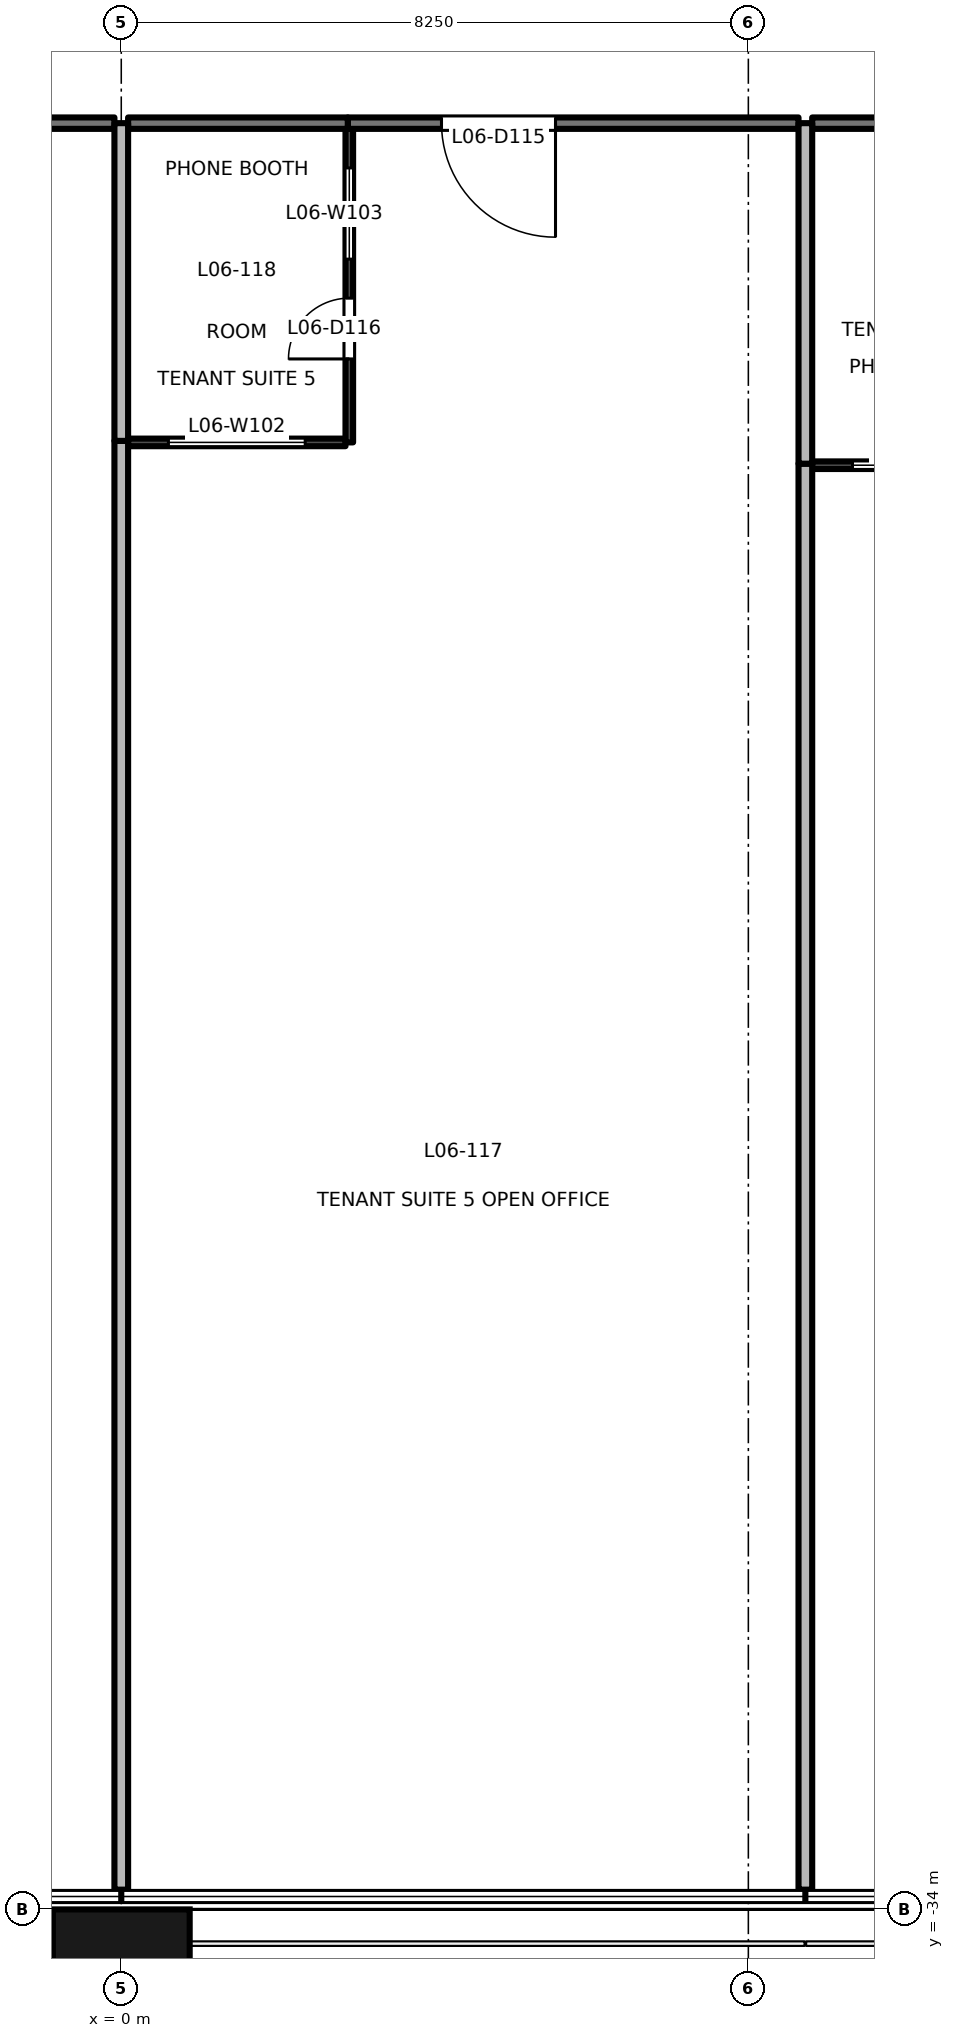
"""IFC4 building model, lengths in metres.
Left out: names, types, materials, properties, quantities, classifications, styles, units other than length and angle.
Written with IfcOpenShell. Run it as: python <this file> out.ifc"""

import sys

from ifc_helpers import new_model, si_unit, direction, frame, frame_2d, origin, origin_2d, place, context, subcontext, project, spatial, rectangle, extrude, element, fill, save


model = new_model("IFC4")
c1 = context("Model", 3, precision=1e-05, world=origin(), true_north=direction((0.0, 1.0)))
c2 = subcontext(c1, "Body", "Model", "MODEL_VIEW")
j1 = project(units=[si_unit("LENGTHUNIT", "METRE"), si_unit("PLANEANGLEUNIT", "RADIAN")], contexts=[c1])
p1 = place(None, origin())
s1 = spatial("IfcSite", under=j1, at=p1, CompositionType="ELEMENT")
p2 = place(p1, origin())
s2 = spatial("IfcBuilding", under=s1, at=p2, CompositionType="ELEMENT")
p3 = place(p2, frame((0.0, 0.0, 32.4)))
s3 = spatial("IfcBuildingStorey", under=s2, at=p3, CompositionType="ELEMENT", Elevation=32.4)
p4 = place(p3, frame((0.0, -34.9, -0.2), z_axis=(0.0, 0.0, 1.0), x_axis=(1.0, 0.0, 0.0)))
e1 = element("IfcColumn", 1, at=p4, inside=s3, PredefinedType="COLUMN", context=c2, shape_type="SweptSolid", body=[
    extrude(rectangle(XDim=1.8, YDim=1.8, at=origin_2d()), origin(), (0.0, 0.0, 1.0), 4.1),
])
p5 = place(p3, frame((-0.09, -10.5, 0.0), z_axis=(0.0, 0.0, 1.0), x_axis=(-1.0, 0.0, 0.0)))
e2 = element("IfcWall", 2, at=p5, inside=s3, PredefinedType="PARTITIONING", context=c2, shape_type="SweptSolid", body=[
    extrude(rectangle(XDim=5.93, YDim=0.15, at=frame_2d((2.965, 0.0))), origin(), (0.0, 0.0, 1.0), 2.9),
])
p6 = place(p5, frame((1.232, 0.0, 0.0)))
e3 = element("IfcOpeningElement", 3, at=p6, cuts=e2, PredefinedType="OPENING", context=c2, shape_type="SweptSolid", body=[
    extrude(rectangle(XDim=1.5, YDim=2.1, at=frame_2d((0.75, 1.05))), frame((0.0, 0.085, 0.0), z_axis=(0.0, -1.0, 0.0), x_axis=(1.0, 0.0, 0.0)), (0.0, 0.0, 1.0), 0.171),
])
p7 = place(p3, frame((8.91, -10.5, 0.0), z_axis=(0.0, 0.0, 1.0), x_axis=(-1.0, 0.0, 0.0)))
e4 = element("IfcWall", 4, at=p7, inside=s3, PredefinedType="PARTITIONING", context=c2, shape_type="SweptSolid", body=[
    extrude(rectangle(XDim=5.93, YDim=0.15, at=frame_2d((2.965, 0.0))), origin(), (0.0, 0.0, 1.0), 2.9),
])
p8 = place(p7, frame((3.197, 0.0, 0.0)))
e5 = element("IfcOpeningElement", 5, at=p8, cuts=e4, PredefinedType="OPENING", context=c2, shape_type="SweptSolid", body=[
    extrude(rectangle(XDim=1.5, YDim=2.1, at=frame_2d((0.75, 1.05))), frame((0.0, 0.085, 0.0), z_axis=(0.0, -1.0, 0.0), x_axis=(1.0, 0.0, 0.0)), (0.0, 0.0, 1.0), 0.171),
])
for number, where, z_axis, x_axis in (
    (6, (2.98, -10.5, 0.0), (0.0, 0.0, 1.0), (-1.0, 0.0, 0.0)),
    (7, (11.98, -10.5, 0.0), (0.0, 0.0, 1.0), (-1.0, 0.0, 0.0)),
):
    element("IfcWall", number, at=place(p3, frame(where, z_axis=z_axis, x_axis=x_axis)), inside=s3, PredefinedType="PARTITIONING", context=c2, shape_type="SweptSolid", body=[
        extrude(rectangle(XDim=2.89, YDim=0.15, at=frame_2d((1.445, 0.0))), origin(), (0.0, 0.0, 1.0), 2.9),
    ])
p9 = place(p3, frame((0.0, -14.68, 0.0), z_axis=(0.0, 0.0, 1.0), x_axis=(0.0, -1.0, 0.0)))
e8 = element("IfcWall", 8, at=p9, inside=s3, PredefinedType="PARTITIONING", context=c2, shape_type="SweptSolid", body=[
    extrude(rectangle(XDim=19.06, YDim=0.18, at=frame_2d((9.53, 0.0))), origin(), (0.0, 0.0, 1.0), 2.9),
])
p10 = place(p3, frame((0.0, -10.5, 0.0), z_axis=(0.0, 0.0, 1.0), x_axis=(0.0, -1.0, 0.0)))
e9 = element("IfcWall", 9, at=p10, inside=s3, PredefinedType="PARTITIONING", context=c2, shape_type="SweptSolid", body=[
    extrude(rectangle(XDim=4.18, YDim=0.18, at=frame_2d((2.09, 0.0))), origin(), (0.0, 0.0, 1.0), 2.9),
])
p11 = place(p3, frame((0.09, -14.7, 0.0), z_axis=(0.0, 0.0, 1.0), x_axis=(1.0, 0.0, 0.0)))
e10 = element("IfcWall", 10, at=p11, inside=s3, PredefinedType="PARTITIONING", context=c2, shape_type="SweptSolid", body=[
    extrude(rectangle(XDim=2.86, YDim=0.1, at=frame_2d((1.43, 0.0))), origin(), (0.0, 0.0, 1.0), 2.9),
])
p12 = place(p11, frame((0.53, 0.0, 0.9)))
e11 = element("IfcOpeningElement", 11, at=p12, cuts=e10, PredefinedType="OPENING", context=c2, shape_type="SweptSolid", body=[
    extrude(rectangle(XDim=1.8, YDim=1.2, at=frame_2d((0.9, 0.6))), frame((0.0, 0.061, 0.0), z_axis=(0.0, -1.0, 0.0), x_axis=(1.0, 0.0, 0.0)), (0.0, 0.0, 1.0), 0.121),
])
p13 = place(p3, frame((3.0, -14.7, 0.0), z_axis=(0.0, 0.0, 1.0), x_axis=(0.0, 1.0, 0.0)))
e12 = element("IfcWall", 12, at=p13, inside=s3, PredefinedType="PARTITIONING", context=c2, shape_type="SweptSolid", body=[
    extrude(rectangle(XDim=4.125, YDim=0.1, at=frame_2d((2.062, 0.0))), origin(), (0.0, 0.0, 1.0), 3.9),
])
p14 = place(p13, frame((1.098, 0.0, 0.0)))
e13 = element("IfcOpeningElement", 13, at=p14, cuts=e12, PredefinedType="OPENING", context=c2, shape_type="SweptSolid", body=[
    extrude(rectangle(XDim=0.8, YDim=2.1, at=frame_2d((0.4, 1.05))), frame((0.0, 0.061, 0.0), z_axis=(0.0, -1.0, 0.0), x_axis=(1.0, 0.0, 0.0)), (0.0, 0.0, 1.0), 0.121),
])
p15 = place(p13, frame((2.411, 0.0, 0.9)))
e14 = element("IfcOpeningElement", 14, at=p15, cuts=e12, PredefinedType="OPENING", context=c2, shape_type="SweptSolid", body=[
    extrude(rectangle(XDim=1.2, YDim=1.2, at=frame_2d((0.6, 0.6))), frame((0.0, 0.061, 0.0), z_axis=(0.0, -1.0, 0.0), x_axis=(1.0, 0.0, 0.0)), (0.0, 0.0, 1.0), 0.121),
])
p16 = place(p3, frame((9.0, -14.98, 0.0), z_axis=(0.0, 0.0, 1.0), x_axis=(0.0, -1.0, 0.0)))
e15 = element("IfcWall", 15, at=p16, inside=s3, PredefinedType="PARTITIONING", context=c2, shape_type="SweptSolid", body=[
    extrude(rectangle(XDim=18.76, YDim=0.18, at=frame_2d((9.38, 0.0))), origin(), (0.0, 0.0, 1.0), 2.9),
])
p17 = place(p3, frame((9.0, -10.5, 0.0), z_axis=(0.0, 0.0, 1.0), x_axis=(0.0, -1.0, 0.0)))
e16 = element("IfcWall", 16, at=p17, inside=s3, PredefinedType="PARTITIONING", context=c2, shape_type="SweptSolid", body=[
    extrude(rectangle(XDim=4.48, YDim=0.18, at=frame_2d((2.24, 0.0))), origin(), (0.0, 0.0, 1.0), 2.9),
])
p18 = place(p3, frame((9.09, -15.0, 0.0), z_axis=(0.0, 0.0, 1.0), x_axis=(1.0, 0.0, 0.0)))
e17 = element("IfcWall", 17, at=p18, inside=s3, PredefinedType="PARTITIONING", context=c2, shape_type="SweptSolid", body=[
    extrude(rectangle(XDim=2.86, YDim=0.1, at=frame_2d((1.43, 0.0))), origin(), (0.0, 0.0, 1.0), 2.9),
])
p19 = place(p18, frame((0.53, 0.0, 0.9)))
e18 = element("IfcOpeningElement", 18, at=p19, cuts=e17, PredefinedType="OPENING", context=c2, shape_type="SweptSolid", body=[
    extrude(rectangle(XDim=1.8, YDim=1.2, at=frame_2d((0.9, 0.6))), frame((0.0, 0.061, 0.0), z_axis=(0.0, -1.0, 0.0), x_axis=(1.0, 0.0, 0.0)), (0.0, 0.0, 1.0), 0.121),
])
p20 = place(p8, origin())
e19 = element("IfcDoor", 19, at=p20, inside=s3, OperationType="DOUBLE_DOOR_SINGLE_SWING", PredefinedType="DOOR", context=c2, shape_type="SweptSolid", body=[
    extrude(rectangle(XDim=1.5, YDim=2.1, at=frame_2d((0.75, 1.05))), frame((0.0, 0.025, 0.0), z_axis=(0.0, -1.0, 0.0), x_axis=(1.0, 0.0, 0.0)), (0.0, 0.0, 1.0), 0.05),
])
fill(e5, e19)
p21 = place(p14, origin())
e20 = element("IfcDoor", 20, at=p21, inside=s3, OperationType="SINGLE_SWING_LEFT", PredefinedType="DOOR", context=c2, shape_type="SweptSolid", body=[
    extrude(rectangle(XDim=0.8, YDim=2.1, at=frame_2d((0.4, 1.05))), frame((0.0, 0.025, 0.0), z_axis=(0.0, -1.0, 0.0), x_axis=(1.0, 0.0, 0.0)), (0.0, 0.0, 1.0), 0.05),
])
fill(e13, e20)
p22 = place(p12, origin())
e21 = element("IfcWindow", 21, at=p22, inside=s3, PartitioningType="SINGLE_PANEL", PredefinedType="WINDOW", context=c2, shape_type="SweptSolid", body=[
    extrude(rectangle(XDim=1.8, YDim=1.2, at=frame_2d((0.9, 0.6))), frame((0.0, 0.03, 0.0), z_axis=(0.0, -1.0, 0.0), x_axis=(1.0, 0.0, 0.0)), (0.0, 0.0, 1.0), 0.06),
])
fill(e11, e21)
p23 = place(p15, origin())
e22 = element("IfcWindow", 22, at=p23, inside=s3, PartitioningType="SINGLE_PANEL", PredefinedType="WINDOW", context=c2, shape_type="SweptSolid", body=[
    extrude(rectangle(XDim=1.2, YDim=1.2, at=frame_2d((0.6, 0.6))), frame((0.0, 0.03, 0.0), z_axis=(0.0, -1.0, 0.0), x_axis=(1.0, 0.0, 0.0)), (0.0, 0.0, 1.0), 0.06),
])
fill(e14, e22)
p24 = place(p19, origin())
e23 = element("IfcWindow", 23, at=p24, inside=s3, PartitioningType="SINGLE_PANEL", PredefinedType="WINDOW", context=c2, shape_type="SweptSolid", body=[
    extrude(rectangle(XDim=1.8, YDim=1.2, at=frame_2d((0.9, 0.6))), frame((0.0, 0.03, 0.0), z_axis=(0.0, -1.0, 0.0), x_axis=(1.0, 0.0, 0.0)), (0.0, 0.0, 1.0), 0.06),
])
fill(e18, e23)
save(model, sys.argv[1])
